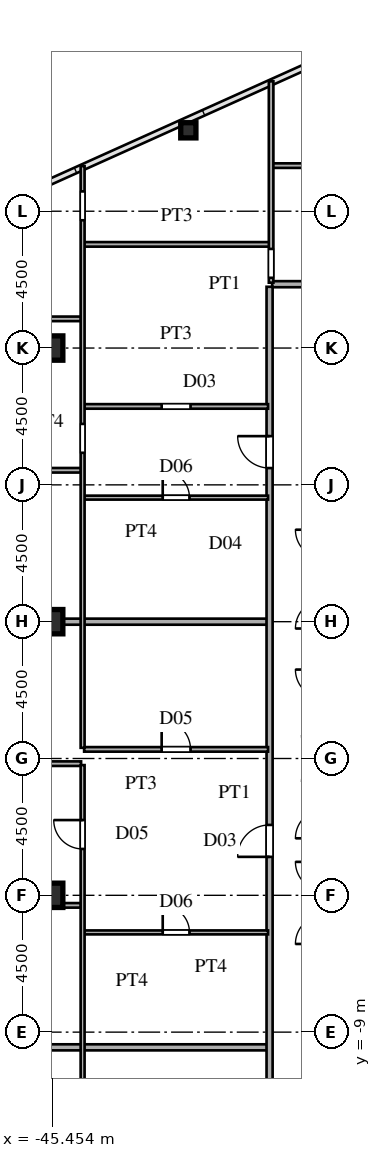
"""IFC4 building model, lengths in metres.
Left out: names, types, materials, properties, quantities, classifications, styles, units other than length and angle.
Written with IfcOpenShell. Run it as: python <this file> out.ifc"""

import sys

from ifc_helpers import new_model, si_unit, direction, frame, frame_2d, origin, origin_2d, place, context, subcontext, project, spatial, rectangle, hollow_rectangle, i_section, extrude, source, transform, mapped, element, fill, save


model = new_model("IFC4")
c1 = context("Model", 3, precision=1e-05, world=origin(), true_north=direction((0.0, 1.0)))
c2 = subcontext(c1, "Body", "Model", "MODEL_VIEW")
j1 = project(units=[si_unit("LENGTHUNIT", "METRE"), si_unit("PLANEANGLEUNIT", "RADIAN")], contexts=[c1])
p1 = place(None, origin())
s1 = spatial("IfcSite", under=j1, at=p1, CompositionType="ELEMENT")
p2 = place(p1, origin())
s2 = spatial("IfcBuilding", under=s1, at=p2, CompositionType="ELEMENT")
p3 = place(p2, frame((0.0, 0.0, 76.5)))
s3 = spatial("IfcBuildingStorey", under=s2, at=p3, CompositionType="ELEMENT", Elevation=76.5)
m1 = source(origin(), c2, "Body", "SweptSolid", [
    extrude(i_section(OverallWidth=0.8, OverallDepth=0.8, WebThickness=0.032, FlangeThickness=0.05, at=origin_2d()), origin(), (0.0, 0.0, 1.0), 3.6),
])
for number, where, z_axis, x_axis in (
    (1, (-45.5, -4.5, 0.0), (0.0, 0.0, 1.0), (1.0, 0.0, 0.0)),
    (2, (-45.5, 4.5, 0.0), (0.0, 0.0, 1.0), (1.0, 0.0, 0.0)),
    (3, (-45.5, 13.5, 0.0), (0.0, 0.0, 1.0), (1.0, 0.0, 0.0)),
):
    element("IfcColumn", number, at=place(p3, frame(where, z_axis=z_axis, x_axis=x_axis)), inside=s3, PredefinedType="COLUMN", context=c2, shape_type="MappedRepresentation", body=[
        mapped(m1, transform((0.0, 0.0, 0.0), scale=1.0)),
    ])
m2 = source(origin(), c2, "Body", "SweptSolid", [
    extrude(hollow_rectangle(XDim=0.5, YDim=0.5, WallThickness=0.02, at=origin_2d()), origin(), (0.0, 0.0, 1.0), 3.6),
])
p4 = place(p3, frame((-40.973, 20.661, 0.0), z_axis=(0.0, 0.0, 1.0), x_axis=(1.0, 0.0, 0.0)))
e4 = element("IfcColumn", 4, at=p4, inside=s3, PredefinedType="COLUMN", context=c2, shape_type="MappedRepresentation", body=[
    mapped(m2, transform((0.0, 0.0, 0.0), scale=1.0)),
])
p5 = place(p3, frame((-66.568, -9.5, 0.0), z_axis=(0.0, 0.0, 1.0), x_axis=(1.0, 0.0, 0.0)))
e5 = element("IfcWall", 5, at=p5, inside=s3, PredefinedType="PARTITIONING", context=c2, shape_type="SweptSolid", body=[
    extrude(rectangle(XDim=28.188, YDim=0.2, at=frame_2d((14.094, 0.0))), origin(), (0.0, 0.0, 1.0), 3.38),
])
p6 = place(p3, frame((-44.4, -5.72, 0.0), z_axis=(0.0, 0.0, 1.0), x_axis=(1.0, 0.0, 0.0)))
e6 = element("IfcWall", 6, at=p6, inside=s3, PredefinedType="PARTITIONING", context=c2, shape_type="SweptSolid", body=[
    extrude(rectangle(XDim=6.05, YDim=0.13, at=frame_2d((3.025, 0.0))), origin(), (0.0, 0.0, 1.0), 3.38),
])
p7 = place(p6, frame((2.585, 0.0, 0.0)))
e7 = element("IfcOpeningElement", 7, at=p7, cuts=e6, PredefinedType="OPENING", context=c2, shape_type="SweptSolid", body=[
    extrude(rectangle(XDim=0.88, YDim=2.1, at=frame_2d((0.44, 1.05))), frame((0.0, 0.075, 0.0), z_axis=(0.0, -1.0, 0.0), x_axis=(1.0, 0.0, 0.0)), (0.0, 0.0, 1.0), 0.15),
])
p8 = place(p3, frame((-71.035, -4.83, 0.0), z_axis=(0.0, 0.0, 1.0), x_axis=(1.0, 0.0, 0.0)))
e8 = element("IfcWall", 8, at=p8, inside=s3, PredefinedType="PARTITIONING", context=c2, shape_type="SweptSolid", body=[
    extrude(rectangle(XDim=26.535, YDim=0.15, at=frame_2d((13.268, 0.0))), origin(), (0.0, 0.0, 1.0), 3.38),
])
p9 = place(p8, frame((21.085, 0.0, 0.0)))
e9 = element("IfcOpeningElement", 9, at=p9, cuts=e8, PredefinedType="OPENING", context=c2, shape_type="SweptSolid", body=[
    extrude(rectangle(XDim=0.95, YDim=2.15, at=frame_2d((0.475, 1.075))), frame((0.0, 0.085, 0.0), z_axis=(0.0, -1.0, 0.0), x_axis=(1.0, 0.0, 0.0)), (0.0, 0.0, 1.0), 0.17),
])
p10 = place(p8, frame((13.21, 0.0, 0.0)))
e10 = element("IfcOpeningElement", 10, at=p10, cuts=e8, PredefinedType="OPENING", context=c2, shape_type="SweptSolid", body=[
    extrude(rectangle(XDim=0.95, YDim=2.15, at=frame_2d((0.475, 1.075))), frame((0.0, 0.085, 0.0), z_axis=(0.0, -1.0, 0.0), x_axis=(1.0, 0.0, 0.0)), (0.0, 0.0, 1.0), 0.17),
])
p11 = place(p3, frame((-71.035, -0.17, 0.0), z_axis=(0.0, 0.0, 1.0), x_axis=(1.0, 0.0, 0.0)))
e11 = element("IfcWall", 11, at=p11, inside=s3, PredefinedType="PARTITIONING", context=c2, shape_type="SweptSolid", body=[
    extrude(rectangle(XDim=26.535, YDim=0.15, at=frame_2d((13.268, 0.0))), origin(), (0.0, 0.0, 1.0), 3.38),
])
p12 = place(p11, frame((21.085, 0.0, 0.0)))
e12 = element("IfcOpeningElement", 12, at=p12, cuts=e11, PredefinedType="OPENING", context=c2, shape_type="SweptSolid", body=[
    extrude(rectangle(XDim=0.95, YDim=2.15, at=frame_2d((0.475, 1.075))), frame((0.0, 0.085, 0.0), z_axis=(0.0, -1.0, 0.0), x_axis=(1.0, 0.0, 0.0)), (0.0, 0.0, 1.0), 0.17),
])
p13 = place(p11, frame((13.21, 0.0, 0.0)))
e13 = element("IfcOpeningElement", 13, at=p13, cuts=e11, PredefinedType="OPENING", context=c2, shape_type="SweptSolid", body=[
    extrude(rectangle(XDim=0.95, YDim=2.15, at=frame_2d((0.475, 1.075))), frame((0.0, 0.085, 0.0), z_axis=(0.0, -1.0, 0.0), x_axis=(1.0, 0.0, 0.0)), (0.0, 0.0, 1.0), 0.17),
])
p14 = place(p3, frame((-44.4, 0.3, 0.0), z_axis=(0.0, 0.0, 1.0), x_axis=(1.0, 0.0, 0.0)))
e14 = element("IfcWall", 14, at=p14, inside=s3, PredefinedType="PARTITIONING", context=c2, shape_type="SweptSolid", body=[
    extrude(rectangle(XDim=6.05, YDim=0.15, at=frame_2d((3.025, 0.0))), origin(), (0.0, 0.0, 1.0), 3.38),
])
p15 = place(p14, frame((2.55, 0.0, 0.0)))
e15 = element("IfcOpeningElement", 15, at=p15, cuts=e14, PredefinedType="OPENING", context=c2, shape_type="SweptSolid", body=[
    extrude(rectangle(XDim=0.95, YDim=2.15, at=frame_2d((0.475, 1.075))), frame((0.0, 0.085, 0.0), z_axis=(0.0, -1.0, 0.0), x_axis=(1.0, 0.0, 0.0)), (0.0, 0.0, 1.0), 0.17),
])
p16 = place(p3, frame((-54.52, 4.5, 0.0), z_axis=(0.0, 0.0, 1.0), x_axis=(1.0, 0.0, 0.0)))
e16 = element("IfcWall", 16, at=p16, inside=s3, PredefinedType="PARTITIONING", context=c2, shape_type="SweptSolid", body=[
    extrude(rectangle(XDim=16.14, YDim=0.2, at=frame_2d((8.07, 0.0))), origin(), (0.0, 0.0, 1.0), 2.68),
])
p17 = place(p3, frame((-44.4, 8.58, 0.0), z_axis=(0.0, 0.0, 1.0), x_axis=(1.0, 0.0, 0.0)))
e17 = element("IfcWall", 17, at=p17, inside=s3, PredefinedType="PARTITIONING", context=c2, shape_type="SweptSolid", body=[
    extrude(rectangle(XDim=6.05, YDim=0.13, at=frame_2d((3.025, 0.0))), origin(), (0.0, 0.0, 1.0), 3.38),
])
p18 = place(p17, frame((2.585, 0.0, 0.0)))
e18 = element("IfcOpeningElement", 18, at=p18, cuts=e17, PredefinedType="OPENING", context=c2, shape_type="SweptSolid", body=[
    extrude(rectangle(XDim=0.88, YDim=2.1, at=frame_2d((0.44, 1.05))), frame((0.0, 0.075, 0.0), z_axis=(0.0, -1.0, 0.0), x_axis=(1.0, 0.0, 0.0)), (0.0, 0.0, 1.0), 0.15),
])
p19 = place(p3, frame((-66.629, 9.48, 0.0), z_axis=(0.0, 0.0, 1.0), x_axis=(1.0, 0.0, 0.0)))
e19 = element("IfcWall", 19, at=p19, inside=s3, PredefinedType="PARTITIONING", context=c2, shape_type="SweptSolid", body=[
    extrude(rectangle(XDim=22.129, YDim=0.15, at=frame_2d((11.064, 0.0))), origin(), (0.0, 0.0, 1.0), 3.38),
])
p20 = place(p19, frame((16.679, 0.0, 0.0)))
e20 = element("IfcOpeningElement", 20, at=p20, cuts=e19, PredefinedType="OPENING", context=c2, shape_type="SweptSolid", body=[
    extrude(rectangle(XDim=0.95, YDim=2.15, at=frame_2d((0.475, 1.075))), frame((0.0, 0.085, 0.0), z_axis=(0.0, -1.0, 0.0), x_axis=(1.0, 0.0, 0.0)), (0.0, 0.0, 1.0), 0.17),
])
p21 = place(p3, frame((-44.4, 11.58, 0.0), z_axis=(0.0, 0.0, 1.0), x_axis=(1.0, 0.0, 0.0)))
e21 = element("IfcWall", 21, at=p21, inside=s3, PredefinedType="PARTITIONING", context=c2, shape_type="SweptSolid", body=[
    extrude(rectangle(XDim=6.05, YDim=0.15, at=frame_2d((3.025, 0.0))), origin(), (0.0, 0.0, 1.0), 3.38),
])
p22 = place(p21, frame((2.55, 0.0, 0.0)))
e22 = element("IfcOpeningElement", 22, at=p22, cuts=e21, PredefinedType="OPENING", context=c2, shape_type="SweptSolid", body=[
    extrude(rectangle(XDim=0.95, YDim=2.15, at=frame_2d((0.475, 1.075))), frame((0.0, 0.085, 0.0), z_axis=(0.0, -1.0, 0.0), x_axis=(1.0, 0.0, 0.0)), (0.0, 0.0, 1.0), 0.17),
])
p23 = place(p3, frame((-54.45, 14.46, 0.0), z_axis=(0.0, 0.0, 1.0), x_axis=(1.0, 0.0, 0.0)))
e23 = element("IfcWall", 23, at=p23, inside=s3, PredefinedType="PARTITIONING", context=c2, shape_type="SweptSolid", body=[
    extrude(rectangle(XDim=9.95, YDim=0.15, at=frame_2d((4.975, 0.0))), origin(), (0.0, 0.0, 1.0), 3.38),
])
p24 = place(p23, frame((4.5, 0.0, 0.0)))
e24 = element("IfcOpeningElement", 24, at=p24, cuts=e23, PredefinedType="OPENING", context=c2, shape_type="SweptSolid", body=[
    extrude(rectangle(XDim=0.95, YDim=2.15, at=frame_2d((0.475, 1.075))), frame((0.0, 0.085, 0.0), z_axis=(0.0, -1.0, 0.0), x_axis=(1.0, 0.0, 0.0)), (0.0, 0.0, 1.0), 0.17),
])
p25 = place(p3, frame((-38.215, 15.6, 0.0), z_axis=(0.0, 0.0, 1.0), x_axis=(1.0, 0.0, 0.0)))
e25 = element("IfcWall", 25, at=p25, inside=s3, PredefinedType="PARTITIONING", context=c2, shape_type="SweptSolid", body=[
    extrude(rectangle(XDim=1.63, YDim=0.2, at=frame_2d((0.815, 0.0))), origin(), (0.0, 0.0, 1.0), 3.38),
])
p26 = place(p3, frame((-44.4, 16.91, 0.0), z_axis=(0.0, 0.0, 1.0), x_axis=(1.0, 0.0, 0.0)))
e26 = element("IfcWall", 26, at=p26, inside=s3, PredefinedType="PARTITIONING", context=c2, shape_type="SweptSolid", body=[
    extrude(rectangle(XDim=6.1, YDim=0.15, at=frame_2d((3.05, 0.0))), origin(), (0.0, 0.0, 1.0), 3.38),
])
p27 = place(p3, frame((-38.2, 19.5, 0.0), z_axis=(0.0, 0.0, 1.0), x_axis=(1.0, 0.0, 0.0)))
e27 = element("IfcWall", 27, at=p27, inside=s3, PredefinedType="PARTITIONING", context=c2, shape_type="SweptSolid", body=[
    extrude(rectangle(XDim=10.735, YDim=0.15, at=frame_2d((5.367, 0.0))), origin(), (0.0, 0.0, 1.0), 3.38),
])
p28 = place(p27, frame((4.85, 0.0, 0.0)))
e28 = element("IfcOpeningElement", 28, at=p28, cuts=e27, PredefinedType="OPENING", context=c2, shape_type="SweptSolid", body=[
    extrude(rectangle(XDim=0.95, YDim=2.15, at=frame_2d((0.475, 1.075))), frame((0.0, 0.085, 0.0), z_axis=(0.0, -1.0, 0.0), x_axis=(1.0, 0.0, 0.0)), (0.0, 0.0, 1.0), 0.17),
])
p29 = place(p3, frame((-44.45, -14.424, 0.0), z_axis=(0.0, 0.0, 1.0), x_axis=(0.0, 1.0, 0.0)))
e29 = element("IfcWall", 29, at=p29, inside=s3, PredefinedType="PARTITIONING", context=c2, shape_type="SweptSolid", body=[
    extrude(rectangle(XDim=14.207, YDim=0.13, at=frame_2d((7.104, 0.0))), origin(), (0.0, 0.0, 1.0), 3.38),
])
p30 = place(p29, frame((11.449, 0.0, 0.0)))
e30 = element("IfcOpeningElement", 30, at=p30, cuts=e29, PredefinedType="OPENING", context=c2, shape_type="SweptSolid", body=[
    extrude(rectangle(XDim=0.95, YDim=2.15, at=frame_2d((0.475, 1.075))), frame((0.0, 0.075, 0.0), z_axis=(0.0, -1.0, 0.0), x_axis=(1.0, 0.0, 0.0)), (0.0, 0.0, 1.0), 0.15),
])
p31 = place(p3, frame((-44.45, 0.352, 0.0), z_axis=(0.0, 0.0, 1.0), x_axis=(0.0, 1.0, 0.0)))
e31 = element("IfcWall", 31, at=p31, inside=s3, PredefinedType="PARTITIONING", context=c2, shape_type="SweptSolid", body=[
    extrude(rectangle(XDim=19.131, YDim=0.13, at=frame_2d((9.565, 0.0))), origin(), (0.0, 0.0, 1.0), 3.38),
])
p32 = place(p31, frame((9.703, 0.0, 0.0)))
e32 = element("IfcOpeningElement", 32, at=p32, cuts=e31, PredefinedType="OPENING", context=c2, shape_type="SweptSolid", body=[
    extrude(rectangle(XDim=0.95, YDim=2.15, at=frame_2d((0.475, 1.075))), frame((0.0, 0.075, 0.0), z_axis=(0.0, -1.0, 0.0), x_axis=(1.0, 0.0, 0.0)), (0.0, 0.0, 1.0), 0.15),
])
p33 = place(p31, frame((17.351, 0.0, 0.0)))
e33 = element("IfcOpeningElement", 33, at=p33, cuts=e31, PredefinedType="OPENING", context=c2, shape_type="SweptSolid", body=[
    extrude(rectangle(XDim=0.95, YDim=2.15, at=frame_2d((0.475, 1.075))), frame((0.0, 0.075, 0.0), z_axis=(0.0, -1.0, 0.0), x_axis=(1.0, 0.0, 0.0)), (0.0, 0.0, 1.0), 0.15),
])
p34 = place(p3, frame((-38.3, -15.515, 0.0), z_axis=(0.0, 0.0, 1.0), x_axis=(0.0, 1.0, 0.0)))
e34 = element("IfcWall", 34, at=p34, inside=s3, PredefinedType="PARTITIONING", context=c2, shape_type="SweptSolid", body=[
    extrude(rectangle(XDim=31.03, YDim=0.2, at=frame_2d((15.515, 0.0))), origin(), (0.0, 0.0, 1.0), 3.38),
])
p35 = place(p34, frame((1.345, 0.0, 0.0)))
e35 = element("IfcOpeningElement", 35, at=p35, cuts=e34, PredefinedType="OPENING", context=c2, shape_type="SweptSolid", body=[
    extrude(rectangle(XDim=1.05, YDim=2.25, at=frame_2d((0.525, 1.125))), frame((0.0, 0.11, 0.0), z_axis=(0.0, -1.0, 0.0), x_axis=(1.0, 0.0, 0.0)), (0.0, 0.0, 1.0), 0.22),
])
p36 = place(p34, frame((12.28, 0.0, 0.0)))
e36 = element("IfcOpeningElement", 36, at=p36, cuts=e34, PredefinedType="OPENING", context=c2, shape_type="SweptSolid", body=[
    extrude(rectangle(XDim=1.05, YDim=2.25, at=frame_2d((0.525, 1.125))), frame((0.0, 0.11, 0.0), z_axis=(0.0, -1.0, 0.0), x_axis=(1.0, 0.0, 0.0)), (0.0, 0.0, 1.0), 0.22),
])
p37 = place(p34, frame((25.067, 0.0, 0.0)))
e37 = element("IfcOpeningElement", 37, at=p37, cuts=e34, PredefinedType="OPENING", context=c2, shape_type="SweptSolid", body=[
    extrude(rectangle(XDim=1.05, YDim=2.25, at=frame_2d((0.525, 1.125))), frame((0.0, 0.11, 0.0), z_axis=(0.0, -1.0, 0.0), x_axis=(1.0, 0.0, 0.0)), (0.0, 0.0, 1.0), 0.22),
])
p38 = place(p3, frame((-38.25, 15.65, 0.0), z_axis=(0.0, 0.0, 1.0), x_axis=(0.0, 1.0, 0.0)))
e38 = element("IfcWall", 38, at=p38, inside=s3, PredefinedType="PARTITIONING", context=c2, shape_type="SweptSolid", body=[
    extrude(rectangle(XDim=6.623, YDim=0.15, at=frame_2d((3.312, 0.0))), origin(), (0.0, 0.0, 1.0), 3.38),
])
p39 = place(p38, frame((0.16, 0.0, 0.0)))
e39 = element("IfcOpeningElement", 39, at=p39, cuts=e38, PredefinedType="OPENING", context=c2, shape_type="SweptSolid", body=[
    extrude(rectangle(XDim=0.95, YDim=2.15, at=frame_2d((0.475, 1.075))), frame((0.0, 0.085, 0.0), z_axis=(0.0, -1.0, 0.0), x_axis=(1.0, 0.0, 0.0)), (0.0, 0.0, 1.0), 0.17),
])
m3 = source(origin(), c2, "Body", "SweptSolid", [
    extrude(rectangle(XDim=0.88, YDim=2.1, at=frame_2d((0.44, 1.05))), frame((0.0, 0.025, 0.0), z_axis=(0.0, -1.0, 0.0), x_axis=(1.0, 0.0, 0.0)), (0.0, 0.0, 1.0), 0.05),
])
p40 = place(p7, origin())
e40 = element("IfcDoor", 40, at=p40, inside=s3, OperationType="SINGLE_SWING_LEFT", PredefinedType="DOOR", context=c2, shape_type="MappedRepresentation", body=[
    mapped(m3, transform((0.0, 0.0, 0.0), scale=1.0)),
])
fill(e7, e40)
m4 = source(origin(), c2, "Body", "SweptSolid", [
    extrude(rectangle(XDim=0.95, YDim=2.15, at=frame_2d((0.475, 1.075))), frame((0.0, 0.025, 0.0), z_axis=(0.0, -1.0, 0.0), x_axis=(1.0, 0.0, 0.0)), (0.0, 0.0, 1.0), 0.05),
])
p41 = place(p15, origin())
e41 = element("IfcDoor", 41, at=p41, inside=s3, OperationType="SINGLE_SWING_LEFT", PredefinedType="DOOR", context=c2, shape_type="MappedRepresentation", body=[
    mapped(m4, transform((0.0, 0.0, 0.0), scale=1.0)),
])
fill(e15, e41)
p42 = place(p18, origin())
e42 = element("IfcDoor", 42, at=p42, inside=s3, OperationType="SINGLE_SWING_LEFT", PredefinedType="DOOR", context=c2, shape_type="MappedRepresentation", body=[
    mapped(m3, transform((0.0, 0.0, 0.0), scale=1.0)),
])
fill(e18, e42)
p43 = place(p30, origin())
e43 = element("IfcDoor", 43, at=p43, inside=s3, OperationType="SINGLE_SWING_RIGHT", PredefinedType="DOOR", context=c2, shape_type="MappedRepresentation", body=[
    mapped(m4, transform((0.0, 0.0, 0.0), scale=1.0)),
])
fill(e30, e43)
m5 = source(origin(), c2, "Body", "SweptSolid", [
    extrude(rectangle(XDim=1.05, YDim=2.25, at=frame_2d((0.525, 1.125))), frame((0.0, 0.025, 0.0), z_axis=(0.0, -1.0, 0.0), x_axis=(1.0, 0.0, 0.0)), (0.0, 0.0, 1.0), 0.05),
])
p44 = place(p36, origin())
e44 = element("IfcDoor", 44, at=p44, inside=s3, OperationType="SINGLE_SWING_LEFT", PredefinedType="DOOR", context=c2, shape_type="MappedRepresentation", body=[
    mapped(m5, transform((0.0, 0.0, 0.0), scale=1.0)),
])
fill(e36, e44)
p45 = place(p37, origin())
e45 = element("IfcDoor", 45, at=p45, inside=s3, OperationType="SINGLE_SWING_RIGHT", PredefinedType="DOOR", context=c2, shape_type="MappedRepresentation", body=[
    mapped(m5, transform((0.0, 0.0, 0.0), scale=1.0)),
])
fill(e37, e45)
save(model, sys.argv[1])
